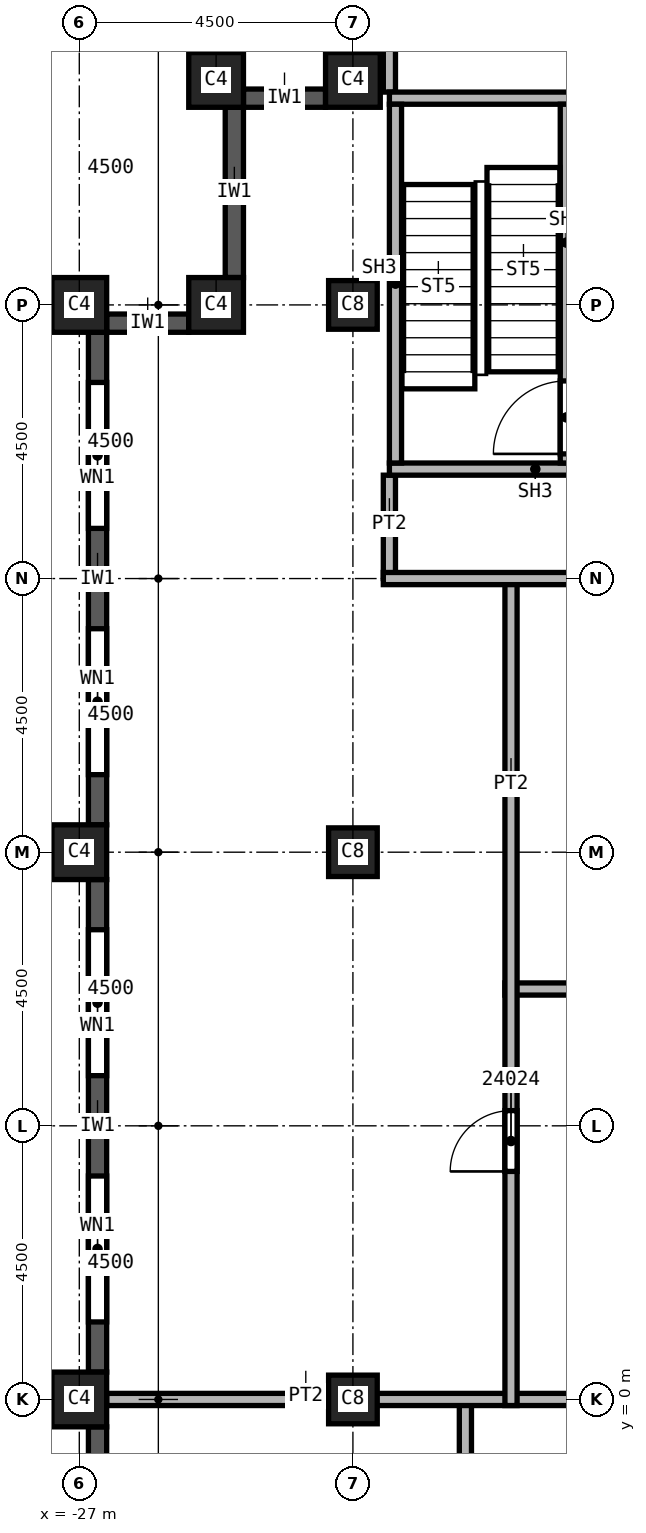
"""IFC4 building model, lengths in metres.
Left out: names, types, materials, properties, quantities, classifications, styles, units other than length and angle.
Written with IfcOpenShell. Run it as: python <this file> out.ifc"""

import sys

from ifc_helpers import new_model, si_unit, direction, frame, frame_2d, origin, origin_2d, place, context, subcontext, project, spatial, rectangle, extrude, element, fill, save


model = new_model("IFC4")
c1 = context("Model", 3, precision=1e-05, world=origin(), true_north=direction((0.0, 1.0)))
c2 = subcontext(c1, "Body", "Model", "MODEL_VIEW")
j1 = project(units=[si_unit("LENGTHUNIT", "METRE"), si_unit("PLANEANGLEUNIT", "RADIAN")], contexts=[c1])
p1 = place(None, origin())
s1 = spatial("IfcSite", under=j1, at=p1, CompositionType="ELEMENT")
p2 = place(p1, origin())
s2 = spatial("IfcBuilding", under=s1, at=p2, CompositionType="ELEMENT")
p3 = place(p2, frame((0.0, 0.0, 342.0)))
s3 = spatial("IfcBuildingStorey", under=s2, at=p3, CompositionType="ELEMENT", Elevation=342.0)
for number, where, z_axis, x_axis in (
    (1, (-22.5, 0.0, 0.0), (0.0, 0.0, 1.0), (1.0, 0.0, 0.0)),
    (2, (-22.5, 9.0, 0.0), (0.0, 0.0, 1.0), (1.0, 0.0, 0.0)),
    (3, (-22.5, 18.0, 0.0), (0.0, 0.0, 1.0), (1.0, 0.0, 0.0)),
):
    element("IfcColumn", number, at=place(p3, frame(where, z_axis=z_axis, x_axis=x_axis)), inside=s3, PredefinedType="COLUMN", context=c2, shape_type="SweptSolid", body=[
        extrude(rectangle(XDim=0.8, YDim=0.8, at=origin_2d()), origin(), (0.0, 0.0, 1.0), 3.74),
    ])
for number, where, z_axis, x_axis in (
    (4, (-27.0, 0.0, 0.0), (0.0, 0.0, 1.0), (0.0, 1.0, 0.0)),
    (5, (-27.0, 9.0, 0.0), (0.0, 0.0, 1.0), (0.0, 1.0, 0.0)),
    (6, (-27.0, 18.0, 0.0), (0.0, 0.0, 1.0), (0.0, 1.0, 0.0)),
    (7, (-22.5, 21.7, 0.0), (0.0, 0.0, 1.0), (1.0, 0.0, 0.0)),
    (8, (-24.75, 21.7, 0.0), (0.0, 0.0, 1.0), (1.0, 0.0, 0.0)),
    (9, (-24.75, 18.0, 0.0), (0.0, 0.0, 1.0), (1.0, 0.0, 0.0)),
):
    element("IfcColumn", number, at=place(p3, frame(where, z_axis=z_axis, x_axis=x_axis)), inside=s3, PredefinedType="COLUMN", context=c2, shape_type="SweptSolid", body=[
        extrude(rectangle(XDim=0.9, YDim=0.9, at=origin_2d()), origin(), (0.0, 0.0, 1.0), 3.74),
    ])
p4 = place(p3, frame((-24.45, 21.25, 0.0), z_axis=(0.0, 0.0, 1.0), x_axis=(0.0, -1.0, 0.0)))
e10 = element("IfcWall", 10, at=p4, inside=s3, PredefinedType="SOLIDWALL", context=c2, shape_type="SweptSolid", body=[
    extrude(rectangle(XDim=2.8, YDim=0.3, at=frame_2d((1.4, 0.0))), origin(), (0.0, 0.0, 1.0), 3.14),
])
p5 = place(p3, frame((-25.2, 17.7, 0.0), z_axis=(0.0, 0.0, 1.0), x_axis=(-1.0, 0.0, 0.0)))
e11 = element("IfcWall", 11, at=p5, inside=s3, PredefinedType="SOLIDWALL", context=c2, shape_type="SweptSolid", body=[
    extrude(rectangle(XDim=1.35, YDim=0.3, at=frame_2d((0.675, 0.0))), origin(), (0.0, 0.0, 1.0), 3.14),
])
p6 = place(p3, frame((-26.7, 17.55, 0.0), z_axis=(0.0, 0.0, 1.0), x_axis=(0.0, -1.0, 0.0)))
e12 = element("IfcWall", 12, at=p6, inside=s3, PredefinedType="SOLIDWALL", context=c2, shape_type="SweptSolid", body=[
    extrude(rectangle(XDim=8.1, YDim=0.3, at=frame_2d((4.05, 0.0))), origin(), (0.0, 0.0, 1.0), 3.14),
])
p7 = place(p6, frame((0.825, 0.0, 0.8)))
e13 = element("IfcOpeningElement", 13, at=p7, cuts=e12, PredefinedType="OPENING", context=c2, shape_type="SweptSolid", body=[
    extrude(rectangle(XDim=2.4, YDim=1.95, at=frame_2d((1.2, 0.975))), frame((0.0, 0.15, 0.0), z_axis=(0.0, -1.0, 0.0), x_axis=(1.0, 0.0, 0.0)), (0.0, 0.0, 1.0), 0.3),
])
p8 = place(p6, frame((4.875, 0.0, 0.8)))
e14 = element("IfcOpeningElement", 14, at=p8, cuts=e12, PredefinedType="OPENING", context=c2, shape_type="SweptSolid", body=[
    extrude(rectangle(XDim=2.4, YDim=1.95, at=frame_2d((1.2, 0.975))), frame((0.0, 0.15, 0.0), z_axis=(0.0, -1.0, 0.0), x_axis=(1.0, 0.0, 0.0)), (0.0, 0.0, 1.0), 0.3),
])
p9 = place(p3, frame((-26.7, 8.55, 0.0), z_axis=(0.0, 0.0, 1.0), x_axis=(0.0, -1.0, 0.0)))
e15 = element("IfcWall", 15, at=p9, inside=s3, PredefinedType="SOLIDWALL", context=c2, shape_type="SweptSolid", body=[
    extrude(rectangle(XDim=8.1, YDim=0.3, at=frame_2d((4.05, 0.0))), origin(), (0.0, 0.0, 1.0), 3.14),
])
p10 = place(p9, frame((0.825, 0.0, 0.8)))
e16 = element("IfcOpeningElement", 16, at=p10, cuts=e15, PredefinedType="OPENING", context=c2, shape_type="SweptSolid", body=[
    extrude(rectangle(XDim=2.4, YDim=1.95, at=frame_2d((1.2, 0.975))), frame((0.0, 0.15, 0.0), z_axis=(0.0, -1.0, 0.0), x_axis=(1.0, 0.0, 0.0)), (0.0, 0.0, 1.0), 0.3),
])
p11 = place(p9, frame((4.875, 0.0, 0.8)))
e17 = element("IfcOpeningElement", 17, at=p11, cuts=e15, PredefinedType="OPENING", context=c2, shape_type="SweptSolid", body=[
    extrude(rectangle(XDim=2.4, YDim=1.95, at=frame_2d((1.2, 0.975))), frame((0.0, 0.15, 0.0), z_axis=(0.0, -1.0, 0.0), x_axis=(1.0, 0.0, 0.0)), (0.0, 0.0, 1.0), 0.3),
])
p12 = place(p3, frame((-26.7, -0.45, 0.0), z_axis=(0.0, 0.0, 1.0), x_axis=(0.0, -1.0, 0.0)))
e18 = element("IfcWall", 18, at=p12, inside=s3, PredefinedType="SOLIDWALL", context=c2, shape_type="SweptSolid", body=[
    extrude(rectangle(XDim=8.1, YDim=0.3, at=frame_2d((4.05, 0.0))), origin(), (0.0, 0.0, 1.0), 3.14),
])
p13 = place(p12, frame((0.825, 0.0, 0.8)))
e19 = element("IfcOpeningElement", 19, at=p13, cuts=e18, PredefinedType="OPENING", context=c2, shape_type="SweptSolid", body=[
    extrude(rectangle(XDim=2.4, YDim=1.95, at=frame_2d((1.2, 0.975))), frame((0.0, 0.15, 0.0), z_axis=(0.0, -1.0, 0.0), x_axis=(1.0, 0.0, 0.0)), (0.0, 0.0, 1.0), 0.3),
])
p14 = place(p12, frame((4.875, 0.0, 0.8)))
e20 = element("IfcOpeningElement", 20, at=p14, cuts=e18, PredefinedType="OPENING", context=c2, shape_type="SweptSolid", body=[
    extrude(rectangle(XDim=2.4, YDim=1.95, at=frame_2d((1.2, 0.975))), frame((0.0, 0.15, 0.0), z_axis=(0.0, -1.0, 0.0), x_axis=(1.0, 0.0, 0.0)), (0.0, 0.0, 1.0), 0.3),
])
p15 = place(p3, frame((-22.95, 21.4, 0.0), z_axis=(0.0, 0.0, 1.0), x_axis=(-1.0, 0.0, 0.0)))
e21 = element("IfcWall", 21, at=p15, inside=s3, PredefinedType="SOLIDWALL", context=c2, shape_type="SweptSolid", body=[
    extrude(rectangle(XDim=1.35, YDim=0.3, at=frame_2d((0.675, 0.0))), origin(), (0.0, 0.0, 1.0), 3.14),
])
p16 = place(p3, frame((-21.9, 13.5, 0.0), z_axis=(0.0, 0.0, 1.0), x_axis=(0.0, 1.0, 0.0)))
e22 = element("IfcWall", 22, at=p16, inside=s3, PredefinedType="PARTITIONING", context=c2, shape_type="SweptSolid", body=[
    extrude(rectangle(XDim=1.7, YDim=0.2, at=frame_2d((0.85, 0.0))), origin(), (0.0, 0.0, 1.0), 3.74),
])
p17 = place(p3, frame((-21.9, 21.5, 0.0), z_axis=(0.0, 0.0, 1.0), x_axis=(0.0, 1.0, 0.0)))
e23 = element("IfcWall", 23, at=p17, inside=s3, PredefinedType="PARTITIONING", context=c2, shape_type="SweptSolid", body=[
    extrude(rectangle(XDim=3.45, YDim=0.2, at=frame_2d((1.725, 0.0))), origin(), (0.0, 0.0, 1.0), 3.74),
])
p18 = place(p3, frame((-20.65, -11.25, 0.0), z_axis=(0.0, 0.0, 1.0), x_axis=(0.0, 1.0, 0.0)))
e24 = element("IfcWall", 24, at=p18, inside=s3, PredefinedType="PARTITIONING", context=c2, shape_type="SweptSolid", body=[
    extrude(rectangle(XDim=11.25, YDim=0.2, at=frame_2d((5.625, 0.0))), origin(), (0.0, 0.0, 1.0), 3.74),
])
p19 = place(p18, frame((7.75, 0.0, 0.0)))
e25 = element("IfcOpeningElement", 25, at=p19, cuts=e24, PredefinedType="OPENING", context=c2, shape_type="SweptSolid", body=[
    extrude(rectangle(XDim=1.0, YDim=2.1, at=frame_2d((0.5, 1.05))), frame((0.0, 0.1, 0.0), z_axis=(0.0, -1.0, 0.0), x_axis=(1.0, 0.0, 0.0)), (0.0, 0.0, 1.0), 0.2),
])
p20 = place(p3, frame((-15.4, 0.0, 0.0), z_axis=(0.0, 0.0, 1.0), x_axis=(-1.0, 0.0, 0.0)))
e26 = element("IfcWall", 26, at=p20, inside=s3, PredefinedType="PARTITIONING", context=c2, shape_type="SweptSolid", body=[
    extrude(rectangle(XDim=11.15, YDim=0.2, at=frame_2d((5.575, 0.0))), origin(), (0.0, 0.0, 1.0), 3.74),
])
p21 = place(p3, frame((-20.0, 6.75, 0.0), z_axis=(0.0, 0.0, 1.0), x_axis=(1.0, 0.0, 0.0)))
e27 = element("IfcWall", 27, at=p21, inside=s3, PredefinedType="PARTITIONING", context=c2, shape_type="SweptSolid", body=[
    extrude(rectangle(XDim=4.6, YDim=0.2, at=frame_2d((2.3, 0.0))), origin(), (0.0, 0.0, 1.0), 3.74),
])
p22 = place(p3, frame((-19.9, -0.1, 0.0), z_axis=(0.0, 0.0, 1.0), x_axis=(0.0, 1.0, 0.0)))
e28 = element("IfcWall", 28, at=p22, inside=s3, PredefinedType="PARTITIONING", context=c2, shape_type="SweptSolid", body=[
    extrude(rectangle(XDim=13.6, YDim=0.2, at=frame_2d((6.8, 0.0))), origin(), (0.0, 0.0, 1.0), 3.74),
])
p23 = place(p22, frame((3.85, 0.0, 0.0)))
e29 = element("IfcOpeningElement", 29, at=p23, cuts=e28, PredefinedType="OPENING", context=c2, shape_type="SweptSolid", body=[
    extrude(rectangle(XDim=1.0, YDim=2.1, at=frame_2d((0.5, 1.05))), frame((0.0, 0.1, 0.0), z_axis=(0.0, -1.0, 0.0), x_axis=(1.0, 0.0, 0.0)), (0.0, 0.0, 1.0), 0.2),
])
p24 = place(p3, frame((-15.4, 13.5, 0.0), z_axis=(0.0, 0.0, 1.0), x_axis=(-1.0, 0.0, 0.0)))
e30 = element("IfcWall", 30, at=p24, inside=s3, PredefinedType="PARTITIONING", context=c2, shape_type="SweptSolid", body=[
    extrude(rectangle(XDim=6.6, YDim=0.2, at=frame_2d((3.3, 0.0))), origin(), (0.0, 0.0, 1.0), 3.74),
])
p25 = place(p3, frame((-21.9, 15.3, 0.0), z_axis=(0.0, 0.0, 1.0), x_axis=(1.0, 0.0, 0.0)))
e31 = element("IfcWall", 31, at=p25, inside=s3, PredefinedType="SOLIDWALL", context=c2, shape_type="SweptSolid", body=[
    extrude(rectangle(XDim=8.275, YDim=0.2, at=frame_2d((4.137, 0.0))), origin(), (0.0, 0.0, 1.0), 3.74),
])
p26 = place(p25, frame((4.8, 0.0, 0.0)))
e32 = element("IfcOpeningElement", 32, at=p26, cuts=e31, PredefinedType="OPENING", context=c2, shape_type="SweptSolid", body=[
    extrude(rectangle(XDim=1.2, YDim=2.1, at=frame_2d((0.6, 1.05))), frame((0.0, 0.1, 0.0), z_axis=(0.0, -1.0, 0.0), x_axis=(1.0, 0.0, 0.0)), (0.0, 0.0, 1.0), 0.2),
])
p27 = place(p3, frame((-21.9, 21.4, 0.0), z_axis=(0.0, 0.0, 1.0), x_axis=(1.0, 0.0, 0.0)))
e33 = element("IfcWall", 33, at=p27, inside=s3, PredefinedType="SOLIDWALL", context=c2, shape_type="SweptSolid", body=[
    extrude(rectangle(XDim=7.8, YDim=0.2, at=frame_2d((3.9, 0.0))), origin(), (0.0, 0.0, 1.0), 3.74),
])
p28 = place(p27, frame((3.2, 0.0, 0.0)))
e34 = element("IfcOpeningElement", 34, at=p28, cuts=e33, PredefinedType="OPENING", context=c2, shape_type="SweptSolid", body=[
    extrude(rectangle(XDim=1.2, YDim=2.1, at=frame_2d((0.6, 1.05))), frame((0.0, 0.1, 0.0), z_axis=(0.0, -1.0, 0.0), x_axis=(1.0, 0.0, 0.0)), (0.0, 0.0, 1.0), 0.2),
])
p29 = place(p3, frame((-21.8, 15.4, 0.0), z_axis=(0.0, 0.0, 1.0), x_axis=(0.0, 1.0, 0.0)))
e35 = element("IfcWall", 35, at=p29, inside=s3, PredefinedType="SOLIDWALL", context=c2, shape_type="SweptSolid", body=[
    extrude(rectangle(XDim=5.9, YDim=0.2, at=frame_2d((2.95, 0.0))), origin(), (0.0, 0.0, 1.0), 3.74),
])
p30 = place(p3, frame((-18.99, 15.4, 0.0), z_axis=(0.0, 0.0, 1.0), x_axis=(0.0, 1.0, 0.0)))
e36 = element("IfcWall", 36, at=p30, inside=s3, PredefinedType="SOLIDWALL", context=c2, shape_type="SweptSolid", body=[
    extrude(rectangle(XDim=5.9, YDim=0.2, at=frame_2d((2.95, 0.0))), origin(), (0.0, 0.0, 1.0), 3.74),
])
p31 = place(p30, frame((0.15, 0.0, 0.0)))
e37 = element("IfcOpeningElement", 37, at=p31, cuts=e36, PredefinedType="OPENING", context=c2, shape_type="SweptSolid", body=[
    extrude(rectangle(XDim=1.2, YDim=2.1, at=frame_2d((0.6, 1.05))), frame((0.0, 0.1, 0.0), z_axis=(0.0, -1.0, 0.0), x_axis=(1.0, 0.0, 0.0)), (0.0, 0.0, 1.0), 0.2),
])
p32 = place(p7, origin())
e38 = element("IfcWindow", 38, at=p32, inside=s3, PartitioningType="SINGLE_PANEL", PredefinedType="WINDOW", context=c2, shape_type="SweptSolid", body=[
    extrude(rectangle(XDim=2.4, YDim=1.95, at=frame_2d((1.2, 0.975))), frame((0.0, 0.03, 0.0), z_axis=(0.0, -1.0, 0.0), x_axis=(1.0, 0.0, 0.0)), (0.0, 0.0, 1.0), 0.06),
])
fill(e13, e38)
p33 = place(p8, origin())
e39 = element("IfcWindow", 39, at=p33, inside=s3, PartitioningType="SINGLE_PANEL", PredefinedType="WINDOW", context=c2, shape_type="SweptSolid", body=[
    extrude(rectangle(XDim=2.4, YDim=1.95, at=frame_2d((1.2, 0.975))), frame((0.0, 0.03, 0.0), z_axis=(0.0, -1.0, 0.0), x_axis=(1.0, 0.0, 0.0)), (0.0, 0.0, 1.0), 0.06),
])
fill(e14, e39)
p34 = place(p10, origin())
e40 = element("IfcWindow", 40, at=p34, inside=s3, PartitioningType="SINGLE_PANEL", PredefinedType="WINDOW", context=c2, shape_type="SweptSolid", body=[
    extrude(rectangle(XDim=2.4, YDim=1.95, at=frame_2d((1.2, 0.975))), frame((0.0, 0.03, 0.0), z_axis=(0.0, -1.0, 0.0), x_axis=(1.0, 0.0, 0.0)), (0.0, 0.0, 1.0), 0.06),
])
fill(e16, e40)
p35 = place(p11, origin())
e41 = element("IfcWindow", 41, at=p35, inside=s3, PartitioningType="SINGLE_PANEL", PredefinedType="WINDOW", context=c2, shape_type="SweptSolid", body=[
    extrude(rectangle(XDim=2.4, YDim=1.95, at=frame_2d((1.2, 0.975))), frame((0.0, 0.03, 0.0), z_axis=(0.0, -1.0, 0.0), x_axis=(1.0, 0.0, 0.0)), (0.0, 0.0, 1.0), 0.06),
])
fill(e17, e41)
p36 = place(p23, origin())
e42 = element("IfcDoor", 42, at=p36, inside=s3, OperationType="SINGLE_SWING_LEFT", PredefinedType="DOOR", context=c2, shape_type="SweptSolid", body=[
    extrude(rectangle(XDim=1.0, YDim=2.1, at=frame_2d((0.5, 1.05))), frame((0.0, 0.025, 0.0), z_axis=(0.0, -1.0, 0.0), x_axis=(1.0, 0.0, 0.0)), (0.0, 0.0, 1.0), 0.05),
])
fill(e29, e42)
p37 = place(p31, origin())
e43 = element("IfcDoor", 43, at=p37, inside=s3, OperationType="SINGLE_SWING_LEFT", PredefinedType="DOOR", context=c2, shape_type="SweptSolid", body=[
    extrude(rectangle(XDim=1.2, YDim=2.1, at=frame_2d((0.6, 1.05))), frame((0.0, 0.025, 0.0), z_axis=(0.0, -1.0, 0.0), x_axis=(1.0, 0.0, 0.0)), (0.0, 0.0, 1.0), 0.05),
])
fill(e37, e43)
save(model, sys.argv[1])
